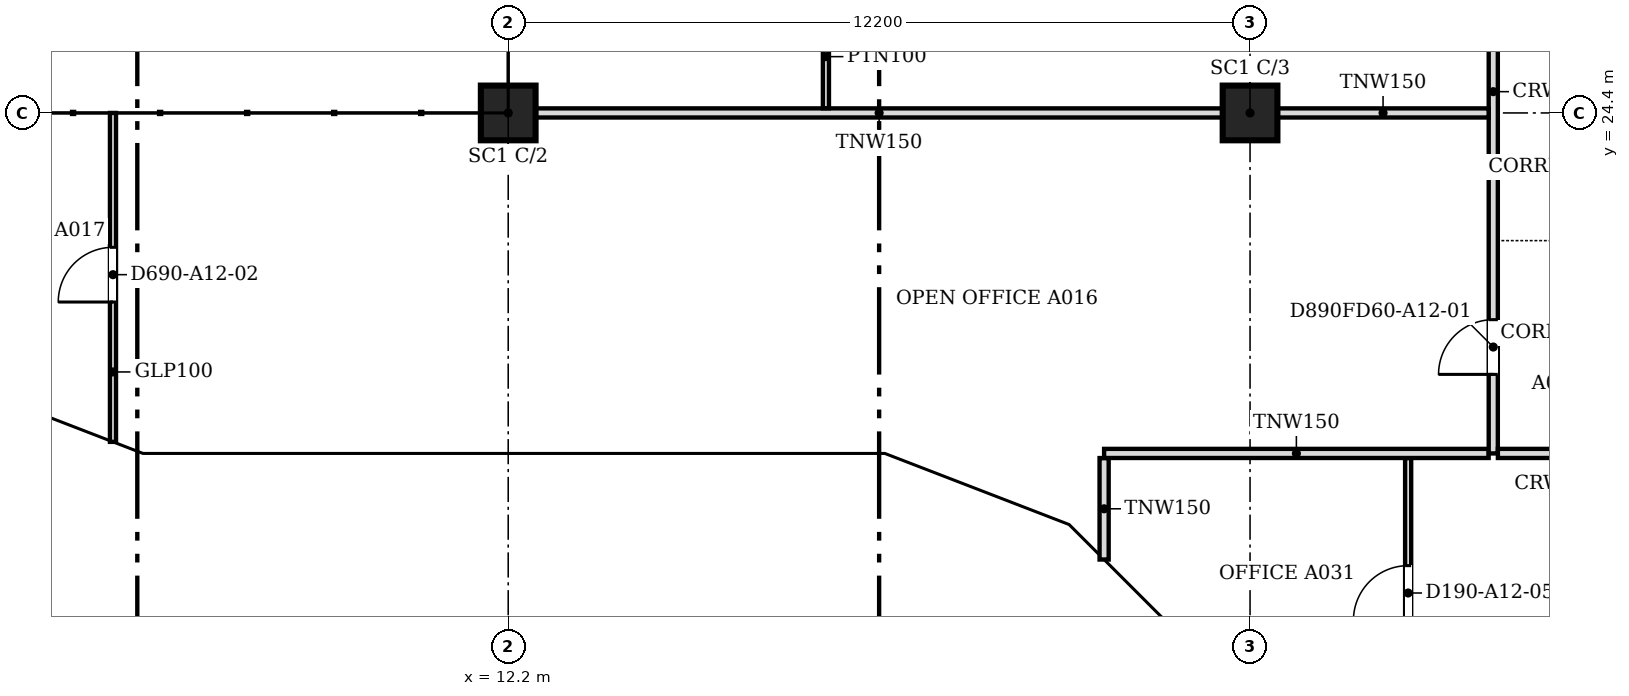
"""IFC4 building model, lengths in metres.
Left out: names, types, materials, properties, quantities, classifications, styles, units other than length and angle.
Written with IfcOpenShell. Run it as: python <this file> out.ifc"""

import sys

from ifc_helpers import new_model, si_unit, direction, frame, frame_2d, origin, origin_2d, place, context, subcontext, project, spatial, polyline, rectangle, outline, extrude, faceted_brep, source, transform, mapped, element, fill, save


model = new_model("IFC4")
c1 = context("Model", 3, precision=1e-05, world=origin(), true_north=direction((0.0, 1.0)))
c2 = subcontext(c1, "Body", "Model", "MODEL_VIEW")
j1 = project(units=[si_unit("LENGTHUNIT", "METRE"), si_unit("PLANEANGLEUNIT", "RADIAN")], contexts=[c1])
p1 = place(None, origin())
s1 = spatial("IfcSite", under=j1, at=p1, CompositionType="ELEMENT")
p2 = place(p1, origin())
s2 = spatial("IfcBuilding", under=s1, at=p2, CompositionType="ELEMENT")
p3 = place(p2, frame((0.0, 0.0, 135.4)))
s3 = spatial("IfcBuildingStorey", under=s2, at=p3, CompositionType="ELEMENT", Elevation=135.4)
for number, where, z_axis, x_axis in (
    (1, (12.2, 24.4, 0.0), (0.0, 0.0, 1.0), (1.0, 0.0, 0.0)),
    (2, (24.4, 24.4, 0.0), (0.0, 0.0, 1.0), (1.0, 0.0, 0.0)),
):
    element("IfcColumn", number, at=place(p3, frame(where, z_axis=z_axis, x_axis=x_axis)), inside=s3, PredefinedType="COLUMN", context=c2, shape_type="SweptSolid", body=[
        extrude(rectangle(XDim=0.9, YDim=0.9, at=origin_2d()), origin(), (0.0, 0.0, 1.0), 3.6),
    ])
m1 = source(origin(), c2, "Body", "Brep", [
    faceted_brep([(2.95, -0.25, 0.0), (2.997, -0.25, 0.059), (2.997, -0.25, 7.541), (2.95, -0.25, 7.6), (0.0, -0.25, 3.8), (0.053, 0.25, 3.868), (2.904, 0.25, 7.54), (2.904, 0.25, 0.06), (0.053, 0.25, 3.732), (2.95, 0.0, 0.0), (2.95, 0.0, 7.6), (0.0, 0.0, 3.8)], [[[0, 1, 2, 3, 4]], [[5, 6, 7, 8]], [[1, 0, 9]], [[10, 3, 2]], [[6, 5, 11, 4, 3, 10]], [[8, 7, 9, 0, 4, 11]], [[8, 11, 5]], [[1, 9, 7, 6, 10, 2]]]),
])
p4 = place(p3, frame((3.394, 19.612, -3.8), z_axis=(0.0, 0.0, 1.0), x_axis=(0.932990326376, -0.359901446078, 0.0)))
e3 = element("IfcWall", 3, at=p4, inside=s3, PredefinedType="SOLIDWALL", context=c2, shape_type="MappedRepresentation", body=[
    mapped(m1, transform((0.0, 0.0, 0.0), scale=1.0)),
])
m2 = source(origin(), c2, "Body", "SweptSolid", [
    extrude(outline(polyline([(2.75, 6.935), (0.316, 3.8), (2.75, 0.665), (2.75, 6.935)])), frame((0.0, 0.26, 0.0), z_axis=(0.0, -1.0, 0.0), x_axis=(1.0, 0.0, 0.0)), (0.0, 0.0, 1.0), 0.52),
])
p5 = place(p4, origin())
e4 = element("IfcOpeningElement", 4, at=p5, cuts=e3, PredefinedType="OPENING", context=c2, shape_type="MappedRepresentation", body=[
    mapped(m2, transform((0.0, 0.0, 0.0), scale=1.0)),
])
m3 = source(origin(), c2, "Body", "Brep", [
    faceted_brep([(0.047, -0.25, 0.0), (3.05, -0.25, 3.8), (0.047, -0.25, 7.6), (0.0, -0.25, 7.54), (0.0, -0.25, 0.06), (0.093, 0.25, 7.541), (3.05, 0.25, 3.8), (0.093, 0.25, 0.059), (0.047, 0.0, 0.0), (0.047, 0.0, 7.6)], [[[0, 1, 2, 3, 4]], [[5, 6, 7]], [[7, 6, 1, 0, 8]], [[6, 5, 9, 2, 1]], [[3, 2, 9]], [[8, 0, 4]], [[7, 8, 4, 3, 9, 5]]]),
])
p6 = place(p3, frame((6.1, 18.55, -3.8), z_axis=(0.0, 0.0, 1.0), x_axis=(1.0, 0.0, 0.0)))
e5 = element("IfcWall", 5, at=p6, inside=s3, PredefinedType="SOLIDWALL", context=c2, shape_type="MappedRepresentation", body=[
    mapped(m3, transform((0.0, 0.0, 0.0), scale=1.0)),
])
m4 = source(origin(), c2, "Body", "SweptSolid", [
    extrude(outline(polyline([(0.247, 0.656), (2.731, 3.8), (0.247, 6.944), (0.247, 0.656)])), frame((0.0, 0.26, 0.0), z_axis=(0.0, -1.0, 0.0), x_axis=(1.0, 0.0, 0.0)), (0.0, 0.0, 1.0), 0.52),
])
p7 = place(p6, origin())
e6 = element("IfcOpeningElement", 6, at=p7, cuts=e5, PredefinedType="OPENING", context=c2, shape_type="MappedRepresentation", body=[
    mapped(m4, transform((0.0, 0.0, 0.0), scale=1.0)),
])
m5 = source(origin(), c2, "Body", "SweptSolid", [
    extrude(outline(polyline([(3.05, 0.0), (6.1, 3.8), (3.05, 7.6), (0.0, 3.8), (3.05, 0.0)])), frame((0.0, 0.25, 0.0), z_axis=(0.0, -1.0, 0.0), x_axis=(1.0, 0.0, 0.0)), (0.0, 0.0, 1.0), 0.5),
])
p8 = place(p3, frame((9.15, 18.55, -3.8), z_axis=(0.0, 0.0, 1.0), x_axis=(1.0, 0.0, 0.0)))
e7 = element("IfcWall", 7, at=p8, inside=s3, PredefinedType="SOLIDWALL", context=c2, shape_type="MappedRepresentation", body=[
    mapped(m5, transform((0.0, 0.0, 0.0), scale=1.0)),
])
m6 = source(origin(), c2, "Body", "SweptSolid", [
    extrude(outline(polyline([(3.05, 0.399), (5.78, 3.8), (3.05, 7.2), (0.321, 3.8), (3.05, 0.399)])), frame((0.0, 0.26, 0.0), z_axis=(0.0, -1.0, 0.0), x_axis=(1.0, 0.0, 0.0)), (0.0, 0.0, 1.0), 0.52),
])
p9 = place(p8, origin())
e8 = element("IfcOpeningElement", 8, at=p9, cuts=e7, PredefinedType="OPENING", context=c2, shape_type="MappedRepresentation", body=[
    mapped(m6, transform((0.0, 0.0, 0.0), scale=1.0)),
])
m7 = source(origin(), c2, "Body", "Brep", [
    faceted_brep([(3.05, -0.25, 7.543), (0.0, -0.25, 3.8), (3.05, -0.25, 0.057), (0.0, 0.25, 3.8), (3.096, 0.25, 7.6), (3.143, 0.25, 7.543), (3.143, 0.25, 0.056), (3.096, 0.25, 0.0), (3.096, -0.0, 0.0), (3.096, -0.0, 7.6)], [[[0, 1, 2]], [[3, 4, 5, 6, 7]], [[7, 6, 8]], [[5, 4, 9]], [[4, 3, 1, 0, 9]], [[3, 7, 8, 2, 1]], [[2, 8, 6, 5, 9, 0]]]),
])
p10 = place(p3, frame((15.25, 18.55, -3.8), z_axis=(0.0, 0.0, 1.0), x_axis=(1.0, 0.0, 0.0)))
e9 = element("IfcWall", 9, at=p10, inside=s3, PredefinedType="SOLIDWALL", context=c2, shape_type="MappedRepresentation", body=[
    mapped(m7, transform((0.0, 0.0, 0.0), scale=1.0)),
])
m8 = source(origin(), c2, "Body", "SweptSolid", [
    extrude(outline(polyline([(2.896, 6.959), (0.323, 3.8), (2.896, 0.641), (2.896, 6.959)])), frame((0.0, 0.26, 0.0), z_axis=(0.0, -1.0, 0.0), x_axis=(1.0, 0.0, 0.0)), (0.0, 0.0, 1.0), 0.52),
])
p11 = place(p10, origin())
e10 = element("IfcOpeningElement", 10, at=p11, cuts=e9, PredefinedType="OPENING", context=c2, shape_type="MappedRepresentation", body=[
    mapped(m8, transform((0.0, 0.0, 0.0), scale=1.0)),
])
m9 = source(origin(), c2, "Body", "Brep", [
    faceted_brep([(0.093, -0.25, 0.056), (3.143, -0.25, 3.736), (3.143, -0.25, 3.864), (0.093, -0.25, 7.544), (0.0, 0.25, 7.543), (0.047, 0.25, 7.6), (3.196, 0.25, 3.8), (0.047, 0.25, 0.0), (0.0, 0.25, 0.057), (3.196, -0.0, 3.8), (0.047, 0.0, 0.0), (0.047, 0.0, 7.6)], [[[0, 1, 2, 3]], [[4, 5, 6, 7, 8]], [[7, 6, 9, 1, 0, 10]], [[6, 5, 11, 3, 2, 9]], [[5, 4, 11]], [[8, 7, 10]], [[8, 10, 0, 3, 11, 4]], [[1, 9, 2]]]),
])
p12 = place(p3, frame((18.303, 18.567, -3.8), z_axis=(0.0, 0.0, 1.0), x_axis=(0.932978940178, -0.359930961693, 0.0)))
e11 = element("IfcWall", 11, at=p12, inside=s3, PredefinedType="SOLIDWALL", context=c2, shape_type="MappedRepresentation", body=[
    mapped(m9, transform((0.0, 0.0, 0.0), scale=1.0)),
])
m10 = source(origin(), c2, "Body", "SweptSolid", [
    extrude(outline(polyline([(0.247, 0.633), (2.871, 3.8), (0.247, 6.967), (0.247, 0.633)])), frame((0.0, 0.26, 0.0), z_axis=(0.0, -1.0, 0.0), x_axis=(1.0, 0.0, 0.0)), (0.0, 0.0, 1.0), 0.52),
])
p13 = place(p12, origin())
e12 = element("IfcOpeningElement", 12, at=p13, cuts=e11, PredefinedType="OPENING", context=c2, shape_type="MappedRepresentation", body=[
    mapped(m10, transform((0.0, 0.0, 0.0), scale=1.0)),
])
m11 = source(origin(), c2, "Body", "Brep", [
    faceted_brep([(3.103, -0.25, 7.536), (0.053, -0.25, 3.864), (0.053, -0.25, 3.736), (3.103, -0.25, 0.064), (0.0, 0.25, 3.8), (3.156, 0.25, 7.6), (3.209, 0.25, 7.536), (3.209, 0.25, 0.064), (3.156, 0.25, 0.0), (3.156, -0.0, 0.0), (3.156, -0.0, 7.6), (0.0, 0.0, 3.8)], [[[0, 1, 2, 3]], [[4, 5, 6, 7, 8]], [[8, 7, 9]], [[6, 5, 10]], [[5, 4, 11, 1, 0, 10]], [[4, 8, 9, 3, 2, 11]], [[11, 2, 1]], [[3, 9, 7, 6, 10, 0]]]),
])
p14 = place(p3, frame((21.285, 17.417, -3.8), z_axis=(0.0, 0.0, 1.0), x_axis=(0.707106781187, -0.707106781187, 0.0)))
e13 = element("IfcWall", 13, at=p14, inside=s3, PredefinedType="SOLIDWALL", context=c2, shape_type="MappedRepresentation", body=[
    mapped(m11, transform((0.0, 0.0, 0.0), scale=1.0)),
])
m12 = source(origin(), c2, "Body", "SweptSolid", [
    extrude(outline(polyline([(2.956, 6.968), (0.325, 3.8), (2.956, 0.632), (2.956, 6.968)])), frame((0.0, 0.26, 0.0), z_axis=(0.0, -1.0, 0.0), x_axis=(1.0, 0.0, 0.0)), (0.0, 0.0, 1.0), 0.52),
])
p15 = place(p14, origin())
e14 = element("IfcOpeningElement", 14, at=p15, cuts=e13, PredefinedType="OPENING", context=c2, shape_type="MappedRepresentation", body=[
    mapped(m12, transform((0.0, 0.0, 0.0), scale=1.0)),
])
p16 = place(p2, frame((0.0, 0.0, 139.2)))
s4 = spatial("IfcBuildingStorey", under=s2, at=p16, CompositionType="ELEMENT", Elevation=139.2)
m13 = source(origin(), c2, "Body", "Brep", [
    faceted_brep([(0.053, -0.25, 0.0), (3.003, -0.25, 3.8), (0.053, -0.25, 7.6), (0.0, -0.25, 7.532), (0.0, -0.25, 0.068), (0.106, 0.25, 7.532), (2.957, 0.25, 3.86), (2.957, 0.25, 3.74), (0.106, 0.25, 0.068), (3.003, 0.0, 3.8), (0.053, 0.0, 0.0), (0.053, 0.0, 7.6)], [[[0, 1, 2, 3, 4]], [[5, 6, 7, 8]], [[8, 7, 9, 1, 0, 10]], [[6, 5, 11, 2, 1, 9]], [[3, 2, 11]], [[10, 0, 4]], [[8, 10, 4, 3, 11, 5]], [[9, 7, 6]]]),
])
p17 = place(p16, frame((3.344, 19.631, -3.8), z_axis=(0.0, 0.0, 1.0), x_axis=(0.933007896601, -0.359855894603, 0.0)))
e15 = element("IfcWall", 15, at=p17, inside=s4, PredefinedType="SOLIDWALL", context=c2, shape_type="MappedRepresentation", body=[
    mapped(m13, transform((0.0, 0.0, 0.0), scale=1.0)),
])
m14 = source(origin(), c2, "Body", "SweptSolid", [
    extrude(outline(polyline([(0.253, 0.665), (2.687, 3.8), (0.253, 6.935), (0.253, 0.665)])), frame((0.0, 0.26, 0.0), z_axis=(0.0, -1.0, 0.0), x_axis=(1.0, 0.0, 0.0)), (0.0, 0.0, 1.0), 0.52),
])
p18 = place(p17, origin())
e16 = element("IfcOpeningElement", 16, at=p18, cuts=e15, PredefinedType="OPENING", context=c2, shape_type="MappedRepresentation", body=[
    mapped(m14, transform((0.0, 0.0, 0.0), scale=1.0)),
])
m15 = source(origin(), c2, "Body", "Brep", [
    faceted_brep([(3.003, -0.25, 0.0), (6.053, -0.25, 3.8), (3.003, -0.25, 7.6), (0.0, -0.25, 3.8), (0.047, 0.25, 3.859), (3.003, 0.25, 7.6), (6.053, 0.25, 3.8), (3.003, 0.25, 0.0), (0.047, 0.25, 3.741), (0.0, 0.0, 3.8)], [[[0, 1, 2, 3]], [[4, 5, 6, 7, 8]], [[7, 6, 1, 0]], [[6, 5, 2, 1]], [[5, 4, 9, 3, 2]], [[8, 7, 0, 3, 9]], [[8, 9, 4]]]),
])
p19 = place(p16, frame((6.146, 18.55, -3.8), z_axis=(0.0, 0.0, 1.0), x_axis=(1.0, 0.0, 0.0)))
e17 = element("IfcWall", 17, at=p19, inside=s4, PredefinedType="SOLIDWALL", context=c2, shape_type="MappedRepresentation", body=[
    mapped(m15, transform((0.0, 0.0, 0.0), scale=1.0)),
])
m16 = source(origin(), c2, "Body", "SweptSolid", [
    extrude(outline(polyline([(3.005, 0.401), (5.733, 3.8), (3.005, 7.199), (0.319, 3.8), (3.005, 0.401)])), frame((0.0, 0.26, 0.0), z_axis=(0.0, -1.0, 0.0), x_axis=(1.0, 0.0, 0.0)), (0.0, 0.0, 1.0), 0.52),
])
p20 = place(p19, origin())
e18 = element("IfcOpeningElement", 18, at=p20, cuts=e17, PredefinedType="OPENING", context=c2, shape_type="MappedRepresentation", body=[
    mapped(m16, transform((0.0, 0.0, 0.0), scale=1.0)),
])
m17 = source(origin(), c2, "Body", "Brep", [
    faceted_brep([(3.05, -0.25, 0.0), (6.1, -0.25, 3.743), (6.1, -0.25, 3.857), (3.05, -0.25, 7.6), (0.0, -0.25, 3.8), (0.0, 0.25, 3.8), (3.05, 0.25, 7.6), (6.146, 0.25, 3.8), (3.05, 0.25, 0.0), (6.146, -0.0, 3.8)], [[[0, 1, 2, 3, 4]], [[5, 6, 7, 8]], [[8, 7, 9, 1, 0]], [[7, 6, 3, 2, 9]], [[6, 5, 4, 3]], [[5, 8, 0, 4]], [[1, 9, 2]]]),
])
p21 = place(p16, frame((12.2, 18.55, -3.8), z_axis=(0.0, 0.0, 1.0), x_axis=(1.0, 0.0, 0.0)))
e19 = element("IfcWall", 19, at=p21, inside=s4, PredefinedType="SOLIDWALL", context=c2, shape_type="MappedRepresentation", body=[
    mapped(m17, transform((0.0, 0.0, 0.0), scale=1.0)),
])
m18 = source(origin(), c2, "Body", "SweptSolid", [
    extrude(outline(polyline([(3.052, 0.398), (5.824, 3.8), (3.052, 7.203), (0.321, 3.8), (3.052, 0.398)])), frame((0.0, 0.26, 0.0), z_axis=(0.0, -1.0, 0.0), x_axis=(1.0, 0.0, 0.0)), (0.0, 0.0, 1.0), 0.52),
])
p22 = place(p21, origin())
e20 = element("IfcOpeningElement", 20, at=p22, cuts=e19, PredefinedType="OPENING", context=c2, shape_type="MappedRepresentation", body=[
    mapped(m18, transform((0.0, 0.0, 0.0), scale=1.0)),
])
m19 = source(origin(), c2, "Body", "Brep", [
    faceted_brep([(3.096, -0.25, 7.536), (0.047, -0.25, 3.856), (0.047, -0.25, 3.744), (3.096, -0.25, 0.064), (0.0, 0.25, 3.8), (3.149, 0.25, 7.6), (3.202, 0.25, 7.536), (3.202, 0.25, 0.064), (3.149, 0.25, 0.0), (3.149, -0.0, 0.0), (3.149, -0.0, 7.6), (0.0, 0.0, 3.8)], [[[0, 1, 2, 3]], [[4, 5, 6, 7, 8]], [[8, 7, 9]], [[6, 5, 10]], [[5, 4, 11, 1, 0, 10]], [[4, 8, 9, 3, 2, 11]], [[11, 2, 1]], [[3, 9, 7, 6, 10, 0]]]),
])
p23 = place(p16, frame((18.346, 18.55, -3.8), z_axis=(0.0, 0.0, 1.0), x_axis=(0.932985567668, -0.359913782069, 0.0)))
e21 = element("IfcWall", 21, at=p23, inside=s4, PredefinedType="SOLIDWALL", context=c2, shape_type="MappedRepresentation", body=[
    mapped(m19, transform((0.0, 0.0, 0.0), scale=1.0)),
])
m20 = source(origin(), c2, "Body", "SweptSolid", [
    extrude(outline(polyline([(2.949, 6.967), (0.325, 3.8), (2.949, 0.633), (2.949, 6.967)])), frame((0.0, 0.26, 0.0), z_axis=(0.0, -1.0, 0.0), x_axis=(1.0, 0.0, 0.0)), (0.0, 0.0, 1.0), 0.52),
])
p24 = place(p23, origin())
e22 = element("IfcOpeningElement", 22, at=p24, cuts=e21, PredefinedType="OPENING", context=c2, shape_type="MappedRepresentation", body=[
    mapped(m20, transform((0.0, 0.0, 0.0), scale=1.0)),
])
m21 = source(origin(), c2, "Body", "Brep", [
    faceted_brep([(0.106, -0.25, 0.064), (3.156, -0.25, 3.736), (3.156, -0.25, 3.864), (0.106, -0.25, 7.536), (0.0, 0.25, 7.536), (0.053, 0.25, 7.6), (3.209, 0.25, 3.8), (0.053, 0.25, 0.0), (0.0, 0.25, 0.064), (3.209, -0.0, 3.8), (0.053, 0.0, 0.0), (0.053, 0.0, 7.6)], [[[0, 1, 2, 3]], [[4, 5, 6, 7, 8]], [[7, 6, 9, 1, 0, 10]], [[6, 5, 11, 3, 2, 9]], [[5, 4, 11]], [[8, 7, 10]], [[8, 10, 0, 3, 11, 4]], [[1, 9, 2]]]),
])
p25 = place(p16, frame((21.248, 17.454, -3.8), z_axis=(0.0, 0.0, 1.0), x_axis=(0.707106781187, -0.707106781187, 0.0)))
e23 = element("IfcWall", 23, at=p25, inside=s4, PredefinedType="SOLIDWALL", context=c2, shape_type="MappedRepresentation", body=[
    mapped(m21, transform((0.0, 0.0, 0.0), scale=1.0)),
])
m22 = source(origin(), c2, "Body", "SweptSolid", [
    extrude(outline(polyline([(0.253, 0.632), (2.884, 3.8), (0.253, 6.968), (0.253, 0.632)])), frame((0.0, 0.26, 0.0), z_axis=(0.0, -1.0, 0.0), x_axis=(1.0, 0.0, 0.0)), (0.0, 0.0, 1.0), 0.52),
])
p26 = place(p25, origin())
e24 = element("IfcOpeningElement", 24, at=p26, cuts=e23, PredefinedType="OPENING", context=c2, shape_type="MappedRepresentation", body=[
    mapped(m22, transform((0.0, 0.0, 0.0), scale=1.0)),
])
p27 = place(p3, frame((27.0, 10.276, 0.0), z_axis=(0.0, 0.0, 1.0), x_axis=(0.0, 1.0, 0.0)))
e25 = element("IfcWall", 25, at=p27, inside=s3, PredefinedType="PARTITIONING", context=c2, shape_type="SweptSolid", body=[
    extrude(rectangle(XDim=8.448, YDim=0.1, at=frame_2d((4.224, 0.0))), origin(), (0.0, 0.0, 1.0), 3.067),
])
m23 = source(origin(), c2, "Body", "SweptSolid", [
    extrude(rectangle(XDim=0.9, YDim=2.1, at=frame_2d((0.45, 1.05))), frame((0.0, 0.06, 0.0), z_axis=(0.0, -1.0, 0.0), x_axis=(1.0, 0.0, 0.0)), (0.0, 0.0, 1.0), 0.12),
])
p28 = place(p27, frame((1.6, 0.0, 0.0)))
e26 = element("IfcOpeningElement", 26, at=p28, cuts=e25, PredefinedType="OPENING", context=c2, shape_type="MappedRepresentation", body=[
    mapped(m23, transform((0.0, 0.0, 0.0), scale=1.0)),
])
p29 = place(p27, frame((5.779, 0.0, 0.0)))
e27 = element("IfcOpeningElement", 27, at=p29, cuts=e25, PredefinedType="OPENING", context=c2, shape_type="MappedRepresentation", body=[
    mapped(m23, transform((0.0, 0.0, 0.0), scale=1.0)),
])
p30 = place(p3, frame((22.0, 17.055, 0.0), z_axis=(0.0, 0.0, 1.0), x_axis=(0.0, 1.0, 0.0)))
e28 = element("IfcWall", 28, at=p30, inside=s3, PredefinedType="PARTITIONING", context=c2, shape_type="SweptSolid", body=[
    extrude(rectangle(XDim=1.669, YDim=0.15, at=frame_2d((0.834, 0.0))), origin(), (0.0, 0.0, 1.0), 3.067),
])
p31 = place(p3, frame((22.0, 18.8, 0.0), z_axis=(0.0, 0.0, 1.0), x_axis=(1.0, 0.0, 0.0)))
e29 = element("IfcWall", 29, at=p31, inside=s3, PredefinedType="PARTITIONING", context=c2, shape_type="SweptSolid", body=[
    extrude(rectangle(XDim=6.324, YDim=0.15, at=frame_2d((3.162, 0.0))), origin(), (0.0, 0.0, 1.0), 3.067),
])
p32 = place(p3, frame((28.4, 18.8, 0.0), z_axis=(0.0, 0.0, 1.0), x_axis=(0.0, 1.0, 0.0)))
e30 = element("IfcWall", 30, at=p32, inside=s3, PredefinedType="PARTITIONING", context=c2, shape_type="SweptSolid", body=[
    extrude(rectangle(XDim=26.824, YDim=0.15, at=frame_2d((13.412, 0.0))), origin(), (0.0, 0.0, 1.0), 3.067),
])
m24 = source(origin(), c2, "Body", "SweptSolid", [
    extrude(rectangle(XDim=0.9, YDim=2.1, at=frame_2d((0.45, 1.05))), frame((0.0, 0.085, 0.0), z_axis=(0.0, -1.0, 0.0), x_axis=(1.0, 0.0, 0.0)), (0.0, 0.0, 1.0), 0.17),
])
p33 = place(p32, frame((1.3, 0.0, 0.0)))
e31 = element("IfcOpeningElement", 31, at=p33, cuts=e30, PredefinedType="OPENING", context=c2, shape_type="MappedRepresentation", body=[
    mapped(m24, transform((0.0, 0.0, 0.0), scale=1.0)),
])
p34 = place(p32, frame((23.351, 0.0, 0.0)))
e32 = element("IfcOpeningElement", 32, at=p34, cuts=e30, PredefinedType="OPENING", context=c2, shape_type="MappedRepresentation", body=[
    mapped(m24, transform((0.0, 0.0, 0.0), scale=1.0)),
])
p35 = place(p32, frame((17.351, 0.0, 0.0)))
e33 = element("IfcOpeningElement", 33, at=p35, cuts=e30, PredefinedType="OPENING", context=c2, shape_type="MappedRepresentation", body=[
    mapped(m24, transform((0.0, 0.0, 0.0), scale=1.0)),
])
p36 = place(p32, frame((9.7, 0.0, 0.0)))
e34 = element("IfcOpeningElement", 34, at=p36, cuts=e30, PredefinedType="OPENING", context=c2, shape_type="MappedRepresentation", body=[
    mapped(m24, transform((0.0, 0.0, 0.0), scale=1.0)),
])
p37 = place(p3, frame((28.476, 18.8, 0.0), z_axis=(0.0, 0.0, 1.0), x_axis=(1.0, 0.0, 0.0)))
e35 = element("IfcWall", 35, at=p37, inside=s3, PredefinedType="PARTITIONING", context=c2, shape_type="SweptSolid", body=[
    extrude(rectangle(XDim=1.948, YDim=0.15, at=frame_2d((0.974, 0.0))), origin(), (0.0, 0.0, 1.0), 3.067),
])
p38 = place(p3, frame((5.7, 18.99, 0.0), z_axis=(0.0, 0.0, 1.0), x_axis=(0.0, 1.0, 0.0)))
e36 = element("IfcWall", 36, at=p38, inside=s3, PredefinedType="PARTITIONING", context=c2, shape_type="SweptSolid", body=[
    extrude(rectangle(XDim=5.41, YDim=0.1, at=frame_2d((2.705, 0.0))), origin(), (0.0, 0.0, 1.0), 3.067),
])
p39 = place(p38, frame((2.3, 0.0, 0.0)))
e37 = element("IfcOpeningElement", 37, at=p39, cuts=e36, PredefinedType="OPENING", context=c2, shape_type="MappedRepresentation", body=[
    mapped(m23, transform((0.0, 0.0, 0.0), scale=1.0)),
])
p40 = place(p3, frame((12.651, 24.4, 0.0), z_axis=(0.0, 0.0, 1.0), x_axis=(1.0, 0.0, 0.0)))
e38 = element("IfcWall", 38, at=p40, inside=s3, PredefinedType="PARTITIONING", context=c2, shape_type="SweptSolid", body=[
    extrude(rectangle(XDim=11.298, YDim=0.15, at=frame_2d((5.649, 0.0))), origin(), (0.0, 0.0, 1.0), 3.067),
])
p41 = place(p3, frame((24.851, 24.4, 0.0), z_axis=(0.0, 0.0, 1.0), x_axis=(1.0, 0.0, 0.0)))
e39 = element("IfcWall", 39, at=p41, inside=s3, PredefinedType="PARTITIONING", context=c2, shape_type="SweptSolid", body=[
    extrude(rectangle(XDim=3.473, YDim=0.15, at=frame_2d((1.736, 0.0))), origin(), (0.0, 0.0, 1.0), 3.067),
])
p42 = place(p3, frame((17.425, 24.476, 0.0), z_axis=(0.0, 0.0, 1.0), x_axis=(0.0, 1.0, 0.0)))
e40 = element("IfcWall", 40, at=p42, inside=s3, PredefinedType="PARTITIONING", context=c2, shape_type="SweptSolid", body=[
    extrude(rectangle(XDim=4.293, YDim=0.1, at=frame_2d((2.146, 0.0))), origin(), (0.0, 0.0, 1.0), 3.067),
])
p43 = place(p42, frame((1.7, 0.0, 0.0)))
e41 = element("IfcOpeningElement", 41, at=p43, cuts=e40, PredefinedType="OPENING", context=c2, shape_type="MappedRepresentation", body=[
    mapped(m23, transform((0.0, 0.0, 0.0), scale=1.0)),
])
m25 = source(origin(), c2, "Body", "SweptSolid", [
    extrude(rectangle(XDim=0.9, YDim=2.1, at=frame_2d((0.45, 1.05))), frame((0.0, 0.025, 0.0), z_axis=(0.0, -1.0, 0.0), x_axis=(1.0, 0.0, 0.0)), (0.0, 0.0, 1.0), 0.05),
])
p44 = place(p33, origin())
e42 = element("IfcDoor", 42, at=p44, inside=s3, OperationType="SINGLE_SWING_LEFT", PredefinedType="DOOR", context=c2, shape_type="MappedRepresentation", body=[
    mapped(m25, transform((0.0, 0.0, 0.0), scale=1.0)),
])
fill(e31, e42)
p45 = place(p29, origin())
e43 = element("IfcDoor", 43, at=p45, inside=s3, OperationType="SINGLE_SWING_LEFT", PredefinedType="DOOR", context=c2, shape_type="MappedRepresentation", body=[
    mapped(m25, transform((0.0, 0.0, 0.0), scale=1.0)),
])
fill(e27, e43)
p46 = place(p39, origin())
e44 = element("IfcDoor", 44, at=p46, inside=s3, OperationType="SINGLE_SWING_LEFT", PredefinedType="DOOR", context=c2, shape_type="MappedRepresentation", body=[
    mapped(m25, transform((0.0, 0.0, 0.0), scale=1.0)),
])
fill(e37, e44)
save(model, sys.argv[1])
